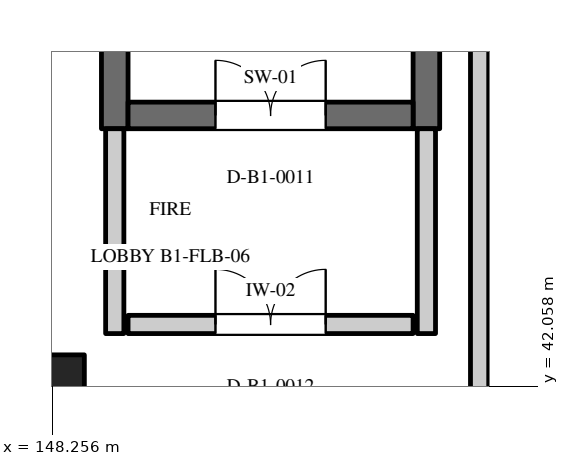
"""IFC4 building model, lengths in metres.
Left out: names, types, materials, properties, quantities, classifications, styles, units other than length and angle.
Written with IfcOpenShell. Run it as: python <this file> out.ifc"""

import sys

from ifc_helpers import new_model, si_unit, direction, frame, frame_2d, origin, origin_2d, place, context, subcontext, project, spatial, rectangle, extrude, element, fill, save


model = new_model("IFC4")
c1 = context("Model", 3, precision=1e-05, world=origin(), true_north=direction((0.0, 1.0)))
c2 = subcontext(c1, "Body", "Model", "MODEL_VIEW")
j1 = project(units=[si_unit("LENGTHUNIT", "METRE"), si_unit("PLANEANGLEUNIT", "RADIAN")], contexts=[c1])
p1 = place(None, origin())
s1 = spatial("IfcSite", under=j1, at=p1, CompositionType="ELEMENT")
p2 = place(p1, origin())
s2 = spatial("IfcBuilding", under=s1, at=p2, CompositionType="ELEMENT")
p3 = place(p2, frame((0.0, 0.0, -4.5)))
s3 = spatial("IfcBuildingStorey", under=s2, at=p3, CompositionType="ELEMENT", Elevation=-4.5)
p4 = place(p3, frame((148.2, 42.0, 0.0), z_axis=(0.0, 0.0, 1.0), x_axis=(1.0, 0.0, 0.0)))
e1 = element("IfcColumn", 1, at=p4, inside=s3, PredefinedType="COLUMN", context=c2, shape_type="SweptSolid", body=[
    extrude(rectangle(XDim=0.95, YDim=0.95, at=origin_2d()), origin(), (0.0, 0.0, 1.0), 4.5),
])
for number, where, z_axis, x_axis in (
    (2, (149.075, 45.45, 0.0), (0.0, 0.0, 1.0), (0.0, 1.0, 0.0)),
    (3, (153.175, 45.45, 0.0), (0.0, 0.0, 1.0), (0.0, 1.0, 0.0)),
):
    element("IfcWall", number, at=place(p3, frame(where, z_axis=z_axis, x_axis=x_axis)), inside=s3, PredefinedType="SHEAR", context=c2, shape_type="SweptSolid", body=[
        extrude(rectangle(XDim=10.5, YDim=0.35, at=frame_2d((5.25, 0.0))), origin(), (0.0, 0.0, 1.0), 4.5),
    ])
p5 = place(p3, frame((149.25, 45.625, 0.0), z_axis=(0.0, 0.0, 1.0), x_axis=(1.0, 0.0, 0.0)))
e4 = element("IfcWall", 4, at=p5, inside=s3, PredefinedType="SHEAR", context=c2, shape_type="SweptSolid", body=[
    extrude(rectangle(XDim=3.75, YDim=0.35, at=frame_2d((1.875, 0.0))), origin(), (0.0, 0.0, 1.0), 4.15),
])
p6 = place(p5, frame((1.15, 0.0, 0.0)))
e5 = element("IfcOpeningElement", 5, at=p6, cuts=e4, PredefinedType="OPENING", context=c2, shape_type="SweptSolid", body=[
    extrude(rectangle(XDim=1.45, YDim=2.2, at=frame_2d((0.725, 1.1))), frame((0.0, 0.187, 0.0), z_axis=(0.0, -1.0, 0.0), x_axis=(1.0, 0.0, 0.0)), (0.0, 0.0, 1.0), 0.374),
])
for number, where, z_axis, x_axis in (
    (6, (149.075, 42.755, 0.0), (0.0, 0.0, 1.0), (0.0, 1.0, 0.0)),
    (7, (153.175, 42.755, 0.0), (0.0, 0.0, 1.0), (0.0, 1.0, 0.0)),
):
    element("IfcWall", number, at=place(p3, frame(where, z_axis=z_axis, x_axis=x_axis)), inside=s3, PredefinedType="STANDARD", context=c2, shape_type="SweptSolid", body=[
        extrude(rectangle(XDim=2.695, YDim=0.24, at=frame_2d((1.348, 0.0))), origin(), (0.0, 0.0, 1.0), 4.15),
    ])
p7 = place(p3, frame((149.25, 42.875, 0.0), z_axis=(0.0, 0.0, 1.0), x_axis=(1.0, 0.0, 0.0)))
e8 = element("IfcWall", 8, at=p7, inside=s3, PredefinedType="STANDARD", context=c2, shape_type="SweptSolid", body=[
    extrude(rectangle(XDim=3.75, YDim=0.24, at=frame_2d((1.875, 0.0))), origin(), (0.0, 0.0, 1.0), 4.15),
])
p8 = place(p7, frame((1.15, 0.0, 0.0)))
e9 = element("IfcOpeningElement", 9, at=p8, cuts=e8, PredefinedType="OPENING", context=c2, shape_type="SweptSolid", body=[
    extrude(rectangle(XDim=1.45, YDim=2.2, at=frame_2d((0.725, 1.1))), frame((0.0, 0.132, 0.0), z_axis=(0.0, -1.0, 0.0), x_axis=(1.0, 0.0, 0.0)), (0.0, 0.0, 1.0), 0.264),
])
p9 = place(p3, frame((153.875, 33.71, 0.0), z_axis=(0.0, 0.0, 1.0), x_axis=(0.0, 1.0, 0.0)))
e10 = element("IfcWall", 10, at=p9, inside=s3, PredefinedType="STANDARD", context=c2, shape_type="SweptSolid", body=[
    extrude(rectangle(XDim=12.98, YDim=0.24, at=frame_2d((6.49, 0.0))), origin(), (0.0, 0.0, 1.0), 4.13),
])
p10 = place(p6, origin())
e11 = element("IfcDoor", 11, at=p10, inside=s3, OperationType="DOUBLE_DOOR_SINGLE_SWING", PredefinedType="DOOR", context=c2, shape_type="SweptSolid", body=[
    extrude(rectangle(XDim=1.45, YDim=2.2, at=frame_2d((0.725, 1.1))), frame((0.0, 0.025, 0.0), z_axis=(0.0, -1.0, 0.0), x_axis=(1.0, 0.0, 0.0)), (0.0, 0.0, 1.0), 0.05),
])
fill(e5, e11)
p11 = place(p8, origin())
e12 = element("IfcDoor", 12, at=p11, inside=s3, OperationType="DOUBLE_DOOR_SINGLE_SWING", PredefinedType="DOOR", context=c2, shape_type="SweptSolid", body=[
    extrude(rectangle(XDim=1.45, YDim=2.2, at=frame_2d((0.725, 1.1))), frame((0.0, 0.025, 0.0), z_axis=(0.0, -1.0, 0.0), x_axis=(1.0, 0.0, 0.0)), (0.0, 0.0, 1.0), 0.05),
])
fill(e9, e12)
save(model, sys.argv[1])
